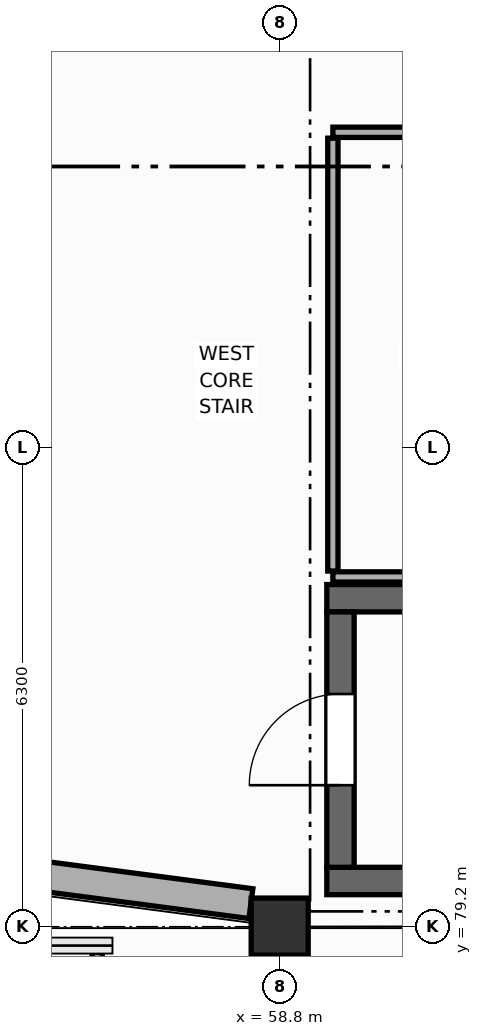
"""IFC4 building model, lengths in metres.
Left out: names, types, materials, properties, quantities, classifications, styles, units other than length and angle.
Written with IfcOpenShell. Run it as: python <this file> out.ifc"""

import sys

from ifc_helpers import new_model, si_unit, direction, frame, frame_2d, origin, origin_2d, place, context, subcontext, project, spatial, rectangle, extrude, element, fill, save


model = new_model("IFC4")
c1 = context("Model", 3, precision=1e-05, world=origin(), true_north=direction((0.0, 1.0)))
c2 = subcontext(c1, "Body", "Model", "MODEL_VIEW")
j1 = project(units=[si_unit("LENGTHUNIT", "METRE"), si_unit("PLANEANGLEUNIT", "RADIAN")], contexts=[c1])
p1 = place(None, origin())
s1 = spatial("IfcSite", under=j1, at=p1, CompositionType="ELEMENT")
p2 = place(p1, origin())
s2 = spatial("IfcBuilding", under=s1, at=p2, CompositionType="ELEMENT")
p3 = place(p2, frame((0.0, 0.0, 9.9)))
s3 = spatial("IfcBuildingStorey", under=s2, at=p3, CompositionType="ELEMENT", Elevation=9.9)
p4 = place(p3, frame((58.8, 79.2, 0.0), z_axis=(0.0, 0.0, 1.0), x_axis=(1.0, 0.0, 0.0)))
e1 = element("IfcColumn", 1, at=p4, inside=s3, PredefinedType="COLUMN", context=c2, shape_type="SweptSolid", body=[
    extrude(rectangle(XDim=0.75, YDim=0.75, at=origin_2d()), origin(), (0.0, 0.0, 1.0), 4.5),
])
p5 = place(p3, frame((55.572, 79.877, 0.0), z_axis=(0.0, 0.0, 1.0), x_axis=(0.991440991126, -0.130555586306, 0.0)))
e2 = element("IfcWall", 2, at=p5, inside=s3, PredefinedType="ELEMENTEDWALL", context=c2, shape_type="SweptSolid", body=[
    extrude(rectangle(XDim=2.874, YDim=0.395, at=frame_2d((1.437, 0.0))), origin(), (0.0, 0.0, 1.0), 3.38),
])
for number, where, z_axis, x_axis in (
    (3, (59.42, 83.52, 0.0), (0.0, 0.0, 1.0), (1.0, 0.0, 0.0)),
    (4, (68.78, 79.8, 0.0), (0.0, 0.0, 1.0), (-1.0, 0.0, 0.0)),
):
    element("IfcWall", number, at=place(p3, frame(where, z_axis=z_axis, x_axis=x_axis)), inside=s3, PredefinedType="SHEAR", context=c2, shape_type="SweptSolid", body=[
        extrude(rectangle(XDim=9.36, YDim=0.36, at=frame_2d((4.68, 0.0))), origin(), (0.0, 0.0, 1.0), 4.25),
    ])
p6 = place(p3, frame((59.6, 79.98, 0.0), z_axis=(0.0, 0.0, 1.0), x_axis=(0.0, 1.0, 0.0)))
e5 = element("IfcWall", 5, at=p6, inside=s3, PredefinedType="SHEAR", context=c2, shape_type="SweptSolid", body=[
    extrude(rectangle(XDim=3.36, YDim=0.36, at=frame_2d((1.68, 0.0))), origin(), (0.0, 0.0, 1.0), 4.25),
])
p7 = place(p6, frame((1.08, 0.0, 0.0)))
e6 = element("IfcOpeningElement", 6, at=p7, cuts=e5, PredefinedType="OPENING", context=c2, shape_type="SweptSolid", body=[
    extrude(rectangle(XDim=1.2, YDim=2.2, at=frame_2d((0.6, 1.1))), frame((0.0, 0.19, 0.0), z_axis=(0.0, -1.0, 0.0), x_axis=(1.0, 0.0, 0.0)), (0.0, 0.0, 1.0), 0.38),
])
p8 = place(p3, frame((59.5, 89.65, 0.0), z_axis=(0.0, 0.0, 1.0), x_axis=(1.0, 0.0, 0.0)))
e7 = element("IfcWall", 7, at=p8, inside=s3, PredefinedType="PARTITIONING", context=c2, shape_type="SweptSolid", body=[
    extrude(rectangle(XDim=3.5, YDim=0.135, at=frame_2d((1.75, 0.0))), origin(), (0.0, 0.0, 1.0), 4.235),
])
p9 = place(p8, frame((1.275, 0.0, 0.0)))
e8 = element("IfcOpeningElement", 8, at=p9, cuts=e7, PredefinedType="OPENING", context=c2, shape_type="SweptSolid", body=[
    extrude(rectangle(XDim=0.95, YDim=2.15, at=frame_2d((0.475, 1.075))), frame((0.0, 0.077, 0.0), z_axis=(0.0, -1.0, 0.0), x_axis=(1.0, 0.0, 0.0)), (0.0, 0.0, 1.0), 0.155),
])
p10 = place(p3, frame((63.0, 83.8, 0.0), z_axis=(0.0, 0.0, 1.0), x_axis=(-1.0, 0.0, 0.0)))
e9 = element("IfcWall", 9, at=p10, inside=s3, PredefinedType="PARTITIONING", context=c2, shape_type="SweptSolid", body=[
    extrude(rectangle(XDim=3.5, YDim=0.135, at=frame_2d((1.75, 0.0))), origin(), (0.0, 0.0, 1.0), 4.235),
])
p11 = place(p3, frame((59.5, 83.877, 0.0), z_axis=(0.0, 0.0, 1.0), x_axis=(0.0, 1.0, 0.0)))
e10 = element("IfcWall", 10, at=p11, inside=s3, PredefinedType="PARTITIONING", context=c2, shape_type="SweptSolid", body=[
    extrude(rectangle(XDim=5.695, YDim=0.135, at=frame_2d((2.848, 0.0))), origin(), (0.0, 0.0, 1.0), 4.235),
])
p12 = place(p3, frame((56.4, 78.86, 0.0), z_axis=(0.0, 0.0, 1.0), x_axis=(0.0, -1.0, 0.0)))
e11 = element("IfcWall", 11, at=p12, inside=s3, PredefinedType="PARTITIONING", context=c2, shape_type="SweptSolid", body=[
    extrude(rectangle(XDim=7.983, YDim=0.135, at=frame_2d((3.991, 0.0))), origin(), (0.0, 0.0, 1.0), 3.38),
])
p13 = place(p7, origin())
e12 = element("IfcDoor", 12, at=p13, inside=s3, OperationType="SINGLE_SWING_LEFT", PredefinedType="DOOR", context=c2, shape_type="SweptSolid", body=[
    extrude(rectangle(XDim=1.2, YDim=2.2, at=frame_2d((0.6, 1.1))), frame((0.0, 0.025, 0.0), z_axis=(0.0, -1.0, 0.0), x_axis=(1.0, 0.0, 0.0)), (0.0, 0.0, 1.0), 0.05),
])
fill(e6, e12)
save(model, sys.argv[1])
